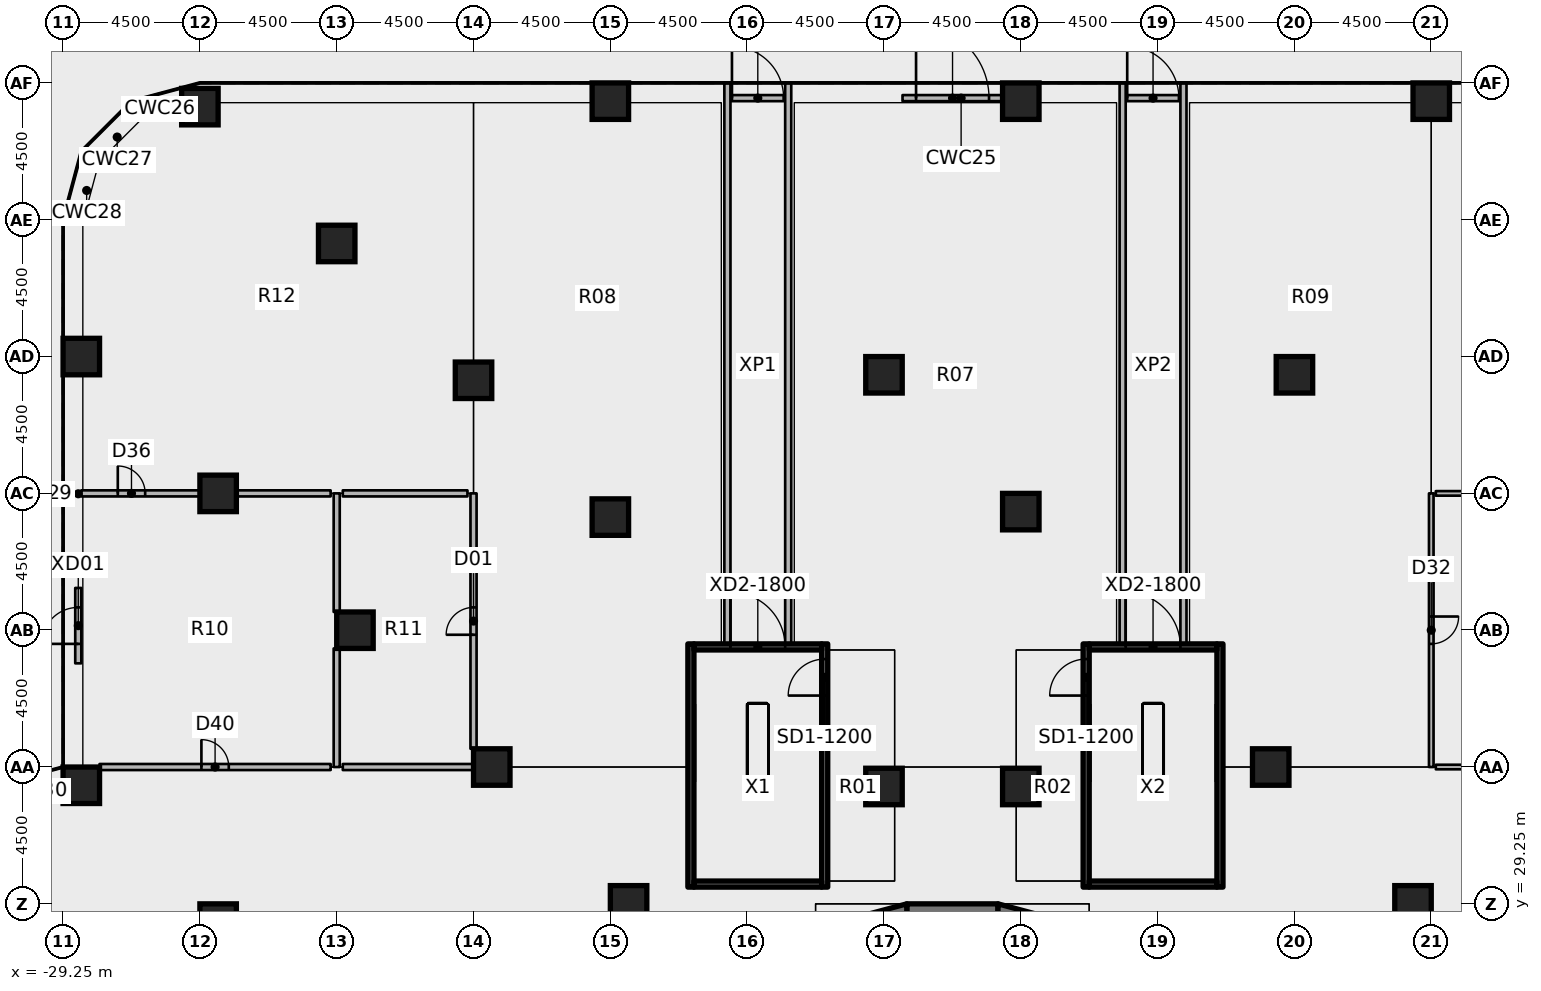
"""IFC4 building model, lengths in metres.
Left out: names, types, materials, properties, quantities, classifications, styles, units other than length and angle.
Written with IfcOpenShell. Run it as: python <this file> out.ifc"""

import sys

from ifc_helpers import new_model, si_unit, direction, frame, frame_2d, origin, origin_2d, place, context, subcontext, project, spatial, polyline, rectangle, outline, extrude, element, fill, save


model = new_model("IFC4")
c1 = context("Model", 3, precision=1e-05, world=origin(), true_north=direction((0.0, 1.0)))
c2 = subcontext(c1, "Body", "Model", "MODEL_VIEW")
j1 = project(units=[si_unit("LENGTHUNIT", "METRE"), si_unit("PLANEANGLEUNIT", "RADIAN")], contexts=[c1])
p1 = place(None, origin())
s1 = spatial("IfcSite", under=j1, at=p1, CompositionType="ELEMENT")
p2 = place(p1, origin())
s2 = spatial("IfcBuilding", under=s1, at=p2, CompositionType="ELEMENT")
p3 = place(p2, origin())
s3 = spatial("IfcBuildingStorey", under=s2, at=p3, CompositionType="ELEMENT", Elevation=0.0)
for number, where, z_axis, x_axis in (
    (1, (-28.65, 33.15, 0.0), (0.0, 0.0, 1.0), (1.0, 0.0, 0.0)),
    (2, (-28.65, 47.25, 0.0), (0.0, 0.0, 1.0), (1.0, 0.0, 0.0)),
    (3, (-24.15, 28.65, 0.0), (0.0, 0.0, 1.0), (1.0, 0.0, 0.0)),
    (4, (-24.15, 42.75, 0.0), (0.0, 0.0, 1.0), (1.0, 0.0, 0.0)),
    (5, (-24.75, 55.47, 0.0), (0.0, 0.0, 1.0), (1.0, 0.0, 0.0)),
    (6, (-19.65, 38.25, 0.0), (0.0, 0.0, 1.0), (1.0, 0.0, 0.0)),
    (7, (-20.25, 50.97, 0.0), (0.0, 0.0, 1.0), (1.0, 0.0, 0.0)),
    (8, (-15.15, 33.75, 0.0), (0.0, 0.0, 1.0), (1.0, 0.0, 0.0)),
    (9, (-15.75, 46.47, 0.0), (0.0, 0.0, 1.0), (1.0, 0.0, 0.0)),
    (10, (-10.65, 29.25, 0.0), (0.0, 0.0, 1.0), (1.0, 0.0, 0.0)),
    (11, (-11.25, 41.97, 0.0), (0.0, 0.0, 1.0), (1.0, 0.0, 0.0)),
    (12, (-11.25, 55.65, 0.0), (0.0, 0.0, 1.0), (1.0, 0.0, 0.0)),
    (13, (-2.25, 33.11, 0.0), (0.0, 0.0, 1.0), (1.0, 0.0, 0.0)),
    (14, (-2.25, 46.65, 0.0), (0.0, 0.0, 1.0), (1.0, 0.0, 0.0)),
    (15, (2.25, 33.11, 0.0), (0.0, 0.0, 1.0), (1.0, 0.0, 0.0)),
    (16, (2.25, 42.15, 0.0), (0.0, 0.0, 1.0), (1.0, 0.0, 0.0)),
    (17, (2.25, 55.65, 0.0), (0.0, 0.0, 1.0), (1.0, 0.0, 0.0)),
    (18, (10.47, 33.75, 0.0), (0.0, 0.0, 1.0), (1.0, 0.0, 0.0)),
    (19, (11.25, 46.65, 0.0), (0.0, 0.0, 1.0), (1.0, 0.0, 0.0)),
    (20, (15.15, 29.25, 0.0), (0.0, 0.0, 1.0), (1.0, 0.0, 0.0)),
    (21, (15.75, 55.65, 0.0), (0.0, 0.0, 1.0), (1.0, 0.0, 0.0)),
):
    element("IfcColumn", number, at=place(p3, frame(where, z_axis=z_axis, x_axis=x_axis)), inside=s3, PredefinedType="COLUMN", context=c2, shape_type="SweptSolid", body=[
        extrude(rectangle(XDim=1.2, YDim=1.2, at=origin_2d()), origin(), (0.0, 0.0, 1.0), 6.55),
    ])
p4 = place(p3, frame((-1.5, 28.8, 0.0), z_axis=(0.0, 0.0, 1.0), x_axis=(1.0, 0.0, 0.0)))
e22 = element("IfcWall", 22, at=p4, inside=s3, PredefinedType="SHEAR", context=c2, shape_type="SweptSolid", body=[
    extrude(rectangle(XDim=3.0, YDim=0.9, at=frame_2d((1.5, 0.0))), origin(), (0.0, 0.0, 1.0), 7.0),
])
p5 = place(p3, origin())
e23 = element("IfcWall", 23, at=p5, inside=s3, PredefinedType="SHEAR", context=c2, shape_type="SweptSolid", body=[
    extrude(outline(polyline([(-3.0, 28.848), (-1.5, 29.25), (-1.5, 28.35), (-2.55, 28.069), (-3.0, 28.848)])), origin(), (0.0, 0.0, 1.0), 7.0),
])
p6 = place(p3, origin())
e24 = element("IfcWall", 24, at=p6, inside=s3, PredefinedType="SHEAR", context=c2, shape_type="SweptSolid", body=[
    extrude(outline(polyline([(3.0, 28.848), (1.5, 29.25), (1.5, 28.35), (2.55, 28.069), (3.0, 28.848)])), origin(), (0.0, 0.0, 1.0), 7.0),
])
p7 = place(p3, frame((-1.64, 55.75, 0.0), z_axis=(0.0, 0.0, 1.0), x_axis=(1.0, 0.0, 0.0)))
e25 = element("IfcWall", 25, at=p7, inside=s3, PredefinedType="SOLIDWALL", context=c2, shape_type="SweptSolid", body=[
    extrude(rectangle(XDim=3.29, YDim=0.2, at=frame_2d((1.645, 0.0))), origin(), (0.0, 0.0, 1.0), 5.6),
])
p8 = place(p7, frame((0.445, 0.0, 0.0)))
e26 = element("IfcOpeningElement", 26, at=p8, cuts=e25, PredefinedType="OPENING", context=c2, shape_type="SweptSolid", body=[
    extrude(rectangle(XDim=2.4, YDim=2.7, at=frame_2d((1.2, 1.35))), frame((0.0, 0.11, 0.0), z_axis=(0.0, -1.0, 0.0), x_axis=(1.0, 0.0, 0.0)), (0.0, 0.0, 1.0), 0.22),
])
p9 = place(p3, frame((-28.75, 37.16, 0.0), z_axis=(0.0, 0.0, 1.0), x_axis=(0.0, 1.0, 0.0)))
e27 = element("IfcWall", 27, at=p9, inside=s3, PredefinedType="SOLIDWALL", context=c2, shape_type="SweptSolid", body=[
    extrude(rectangle(XDim=2.48, YDim=0.2, at=frame_2d((1.24, 0.0))), origin(), (0.0, 0.0, 1.0), 5.6),
])
p10 = place(p9, frame((0.64, 0.0, 0.0)))
e28 = element("IfcOpeningElement", 28, at=p10, cuts=e27, PredefinedType="OPENING", context=c2, shape_type="SweptSolid", body=[
    extrude(rectangle(XDim=1.2, YDim=2.1, at=frame_2d((0.6, 1.05))), frame((0.0, 0.11, 0.0), z_axis=(0.0, -1.0, 0.0), x_axis=(1.0, 0.0, 0.0)), (0.0, 0.0, 1.0), 0.22),
])
p11 = place(p3, frame((-7.3, 55.75, 0.0), z_axis=(0.0, 0.0, 1.0), x_axis=(1.0, 0.0, 0.0)))
e29 = element("IfcWall", 29, at=p11, inside=s3, PredefinedType="SOLIDWALL", context=c2, shape_type="SweptSolid", body=[
    extrude(rectangle(XDim=1.8, YDim=0.2, at=frame_2d((0.9, 0.0))), origin(), (0.0, 0.0, 1.0), 3.0),
])
p12 = place(p11, frame((0.05, 0.0, 0.0)))
e30 = element("IfcOpeningElement", 30, at=p12, cuts=e29, PredefinedType="OPENING", context=c2, shape_type="SweptSolid", body=[
    extrude(rectangle(XDim=1.7, YDim=2.1, at=frame_2d((0.85, 1.05))), frame((0.0, 0.11, 0.0), z_axis=(0.0, -1.0, 0.0), x_axis=(1.0, 0.0, 0.0)), (0.0, 0.0, 1.0), 0.22),
])
p13 = place(p3, frame((5.7, 55.75, 0.0), z_axis=(0.0, 0.0, 1.0), x_axis=(1.0, 0.0, 0.0)))
e31 = element("IfcWall", 31, at=p13, inside=s3, PredefinedType="SOLIDWALL", context=c2, shape_type="SweptSolid", body=[
    extrude(rectangle(XDim=1.8, YDim=0.2, at=frame_2d((0.9, 0.0))), origin(), (0.0, 0.0, 1.0), 3.0),
])
p14 = place(p13, frame((0.05, 0.0, 0.0)))
e32 = element("IfcOpeningElement", 32, at=p14, cuts=e31, PredefinedType="OPENING", context=c2, shape_type="SweptSolid", body=[
    extrude(rectangle(XDim=1.7, YDim=2.1, at=frame_2d((0.85, 1.05))), frame((0.0, 0.11, 0.0), z_axis=(0.0, -1.0, 0.0), x_axis=(1.0, 0.0, 0.0)), (0.0, 0.0, 1.0), 0.22),
])
p15 = place(p3, frame((-8.6, 29.8, 0.0), z_axis=(0.0, 0.0, 1.0), x_axis=(0.0, 1.0, 0.0)))
e33 = element("IfcWall", 33, at=p15, inside=s3, PredefinedType="SHEAR", context=c2, shape_type="SweptSolid", body=[
    extrude(rectangle(XDim=8.0, YDim=0.2, at=frame_2d((4.0, 0.0))), origin(), (0.0, 0.0, 1.0), 6.55),
])
p16 = place(p3, frame((-4.2, 29.8, 0.0), z_axis=(0.0, 0.0, 1.0), x_axis=(0.0, 1.0, 0.0)))
e34 = element("IfcWall", 34, at=p16, inside=s3, PredefinedType="SHEAR", context=c2, shape_type="SweptSolid", body=[
    extrude(rectangle(XDim=8.0, YDim=0.2, at=frame_2d((4.0, 0.0))), origin(), (0.0, 0.0, 1.0), 6.55),
])
p17 = place(p16, frame((6.3, 0.0, 0.0)))
e35 = element("IfcOpeningElement", 35, at=p17, cuts=e34, PredefinedType="OPENING", context=c2, shape_type="SweptSolid", body=[
    extrude(rectangle(XDim=1.2, YDim=2.1, at=frame_2d((0.6, 1.05))), frame((0.0, 0.11, 0.0), z_axis=(0.0, -1.0, 0.0), x_axis=(1.0, 0.0, 0.0)), (0.0, 0.0, 1.0), 0.22),
])
p18 = place(p3, frame((-8.5, 29.9, 0.0), z_axis=(0.0, 0.0, 1.0), x_axis=(1.0, 0.0, 0.0)))
e36 = element("IfcWall", 36, at=p18, inside=s3, PredefinedType="SHEAR", context=c2, shape_type="SweptSolid", body=[
    extrude(rectangle(XDim=4.2, YDim=0.2, at=frame_2d((2.1, 0.0))), origin(), (0.0, 0.0, 1.0), 6.55),
])
p19 = place(p3, frame((-8.5, 37.7, 0.0), z_axis=(0.0, 0.0, 1.0), x_axis=(1.0, 0.0, 0.0)))
e37 = element("IfcWall", 37, at=p19, inside=s3, PredefinedType="SHEAR", context=c2, shape_type="SweptSolid", body=[
    extrude(rectangle(XDim=4.2, YDim=0.2, at=frame_2d((2.1, 0.0))), origin(), (0.0, 0.0, 1.0), 6.55),
])
p20 = place(p19, frame((1.2, 0.0, 0.0)))
e38 = element("IfcOpeningElement", 38, at=p20, cuts=e37, PredefinedType="OPENING", context=c2, shape_type="SweptSolid", body=[
    extrude(rectangle(XDim=1.8, YDim=2.1, at=frame_2d((0.9, 1.05))), frame((0.0, 0.11, 0.0), z_axis=(0.0, -1.0, 0.0), x_axis=(1.0, 0.0, 0.0)), (0.0, 0.0, 1.0), 0.22),
])
for number, where, z_axis, x_axis in (
    (39, (-7.4, 37.6, 0.0), (0.0, 0.0, 1.0), (0.0, 1.0, 0.0)),
    (40, (-5.4, 37.6, 0.0), (0.0, 0.0, 1.0), (0.0, 1.0, 0.0)),
):
    element("IfcWall", number, at=place(p3, frame(where, z_axis=z_axis, x_axis=x_axis)), inside=s3, PredefinedType="PARTITIONING", context=c2, shape_type="SweptSolid", body=[
        extrude(rectangle(XDim=18.65, YDim=0.2, at=frame_2d((9.325, 0.0))), origin(), (0.0, 0.0, 1.0), 6.55),
    ])
p21 = place(p3, frame((4.4, 29.8, 0.0), z_axis=(0.0, 0.0, 1.0), x_axis=(0.0, 1.0, 0.0)))
e41 = element("IfcWall", 41, at=p21, inside=s3, PredefinedType="SHEAR", context=c2, shape_type="SweptSolid", body=[
    extrude(rectangle(XDim=8.0, YDim=0.2, at=frame_2d((4.0, 0.0))), origin(), (0.0, 0.0, 1.0), 6.55),
])
p22 = place(p21, frame((6.3, 0.0, 0.0)))
e42 = element("IfcOpeningElement", 42, at=p22, cuts=e41, PredefinedType="OPENING", context=c2, shape_type="SweptSolid", body=[
    extrude(rectangle(XDim=1.2, YDim=2.1, at=frame_2d((0.6, 1.05))), frame((0.0, 0.11, 0.0), z_axis=(0.0, -1.0, 0.0), x_axis=(1.0, 0.0, 0.0)), (0.0, 0.0, 1.0), 0.22),
])
p23 = place(p3, frame((8.8, 29.8, 0.0), z_axis=(0.0, 0.0, 1.0), x_axis=(0.0, 1.0, 0.0)))
e43 = element("IfcWall", 43, at=p23, inside=s3, PredefinedType="SHEAR", context=c2, shape_type="SweptSolid", body=[
    extrude(rectangle(XDim=8.0, YDim=0.2, at=frame_2d((4.0, 0.0))), origin(), (0.0, 0.0, 1.0), 6.55),
])
p24 = place(p3, frame((4.5, 29.9, 0.0), z_axis=(0.0, 0.0, 1.0), x_axis=(1.0, 0.0, 0.0)))
e44 = element("IfcWall", 44, at=p24, inside=s3, PredefinedType="SHEAR", context=c2, shape_type="SweptSolid", body=[
    extrude(rectangle(XDim=4.2, YDim=0.2, at=frame_2d((2.1, 0.0))), origin(), (0.0, 0.0, 1.0), 6.55),
])
p25 = place(p3, frame((4.5, 37.7, 0.0), z_axis=(0.0, 0.0, 1.0), x_axis=(1.0, 0.0, 0.0)))
e45 = element("IfcWall", 45, at=p25, inside=s3, PredefinedType="SHEAR", context=c2, shape_type="SweptSolid", body=[
    extrude(rectangle(XDim=4.2, YDim=0.2, at=frame_2d((2.1, 0.0))), origin(), (0.0, 0.0, 1.0), 6.55),
])
p26 = place(p25, frame((1.2, 0.0, 0.0)))
e46 = element("IfcOpeningElement", 46, at=p26, cuts=e45, PredefinedType="OPENING", context=c2, shape_type="SweptSolid", body=[
    extrude(rectangle(XDim=1.8, YDim=2.1, at=frame_2d((0.9, 1.05))), frame((0.0, 0.11, 0.0), z_axis=(0.0, -1.0, 0.0), x_axis=(1.0, 0.0, 0.0)), (0.0, 0.0, 1.0), 0.22),
])
for number, where, z_axis, x_axis in (
    (47, (5.6, 37.6, 0.0), (0.0, 0.0, 1.0), (0.0, 1.0, 0.0)),
    (48, (7.6, 37.6, 0.0), (0.0, 0.0, 1.0), (0.0, 1.0, 0.0)),
):
    element("IfcWall", number, at=place(p3, frame(where, z_axis=z_axis, x_axis=x_axis)), inside=s3, PredefinedType="PARTITIONING", context=c2, shape_type="SweptSolid", body=[
        extrude(rectangle(XDim=18.65, YDim=0.2, at=frame_2d((9.325, 0.0))), origin(), (0.0, 0.0, 1.0), 6.55),
    ])
p27 = place(p3, frame((-15.75, 34.35, 0.0), z_axis=(0.0, 0.0, 1.0), x_axis=(0.0, 1.0, 0.0)))
e49 = element("IfcWall", 49, at=p27, inside=s3, PredefinedType="PARTITIONING", context=c2, shape_type="SweptSolid", body=[
    extrude(rectangle(XDim=8.4, YDim=0.2, at=frame_2d((4.2, 0.0))), origin(), (0.0, 0.0, 1.0), 6.55),
])
p28 = place(p27, frame((3.75, 0.0, 0.0)))
e50 = element("IfcOpeningElement", 50, at=p28, cuts=e49, PredefinedType="OPENING", context=c2, shape_type="SweptSolid", body=[
    extrude(rectangle(XDim=0.9, YDim=2.1, at=frame_2d((0.45, 1.05))), frame((0.0, 0.11, 0.0), z_axis=(0.0, -1.0, 0.0), x_axis=(1.0, 0.0, 0.0)), (0.0, 0.0, 1.0), 0.22),
])
p29 = place(p3, frame((15.75, 42.75, 0.0), z_axis=(0.0, 0.0, 1.0), x_axis=(0.0, -1.0, 0.0)))
e51 = element("IfcWall", 51, at=p29, inside=s3, PredefinedType="PARTITIONING", context=c2, shape_type="SweptSolid", body=[
    extrude(rectangle(XDim=9.0, YDim=0.15, at=frame_2d((4.5, 0.0))), origin(), (0.0, 0.0, 1.0), 6.55),
])
p30 = place(p29, frame((4.05, 0.0, 0.0)))
e52 = element("IfcOpeningElement", 52, at=p30, cuts=e51, PredefinedType="OPENING", context=c2, shape_type="SweptSolid", body=[
    extrude(rectangle(XDim=0.9, YDim=2.1, at=frame_2d((0.45, 1.05))), frame((0.0, 0.085, 0.0), z_axis=(0.0, -1.0, 0.0), x_axis=(1.0, 0.0, 0.0)), (0.0, 0.0, 1.0), 0.17),
])
for number, where, z_axis, x_axis in (
    (53, (-20.25, 42.75, 0.0), (0.0, 0.0, 1.0), (0.0, -1.0, 0.0)),
    (54, (-20.25, 37.65, 0.0), (0.0, 0.0, 1.0), (0.0, -1.0, 0.0)),
):
    element("IfcWall", number, at=place(p3, frame(where, z_axis=z_axis, x_axis=x_axis)), inside=s3, PredefinedType="PARTITIONING", context=c2, shape_type="SweptSolid", body=[
        extrude(rectangle(XDim=3.9, YDim=0.2, at=frame_2d((1.95, 0.0))), origin(), (0.0, 0.0, 1.0), 6.55),
    ])
p31 = place(p3, frame((-28.65, 42.75, 0.0), z_axis=(0.0, 0.0, 1.0), x_axis=(1.0, 0.0, 0.0)))
e55 = element("IfcWall", 55, at=p31, inside=s3, PredefinedType="PARTITIONING", context=c2, shape_type="SweptSolid", body=[
    extrude(rectangle(XDim=3.9, YDim=0.2, at=frame_2d((1.95, 0.0))), origin(), (0.0, 0.0, 1.0), 6.55),
])
p32 = place(p31, frame((1.2, 0.0, 0.0)))
e56 = element("IfcOpeningElement", 56, at=p32, cuts=e55, PredefinedType="OPENING", context=c2, shape_type="SweptSolid", body=[
    extrude(rectangle(XDim=0.9, YDim=2.1, at=frame_2d((0.45, 1.05))), frame((0.0, 0.11, 0.0), z_axis=(0.0, -1.0, 0.0), x_axis=(1.0, 0.0, 0.0)), (0.0, 0.0, 1.0), 0.22),
])
p33 = place(p3, frame((-23.55, 42.75, 0.0), z_axis=(0.0, 0.0, 1.0), x_axis=(1.0, 0.0, 0.0)))
e57 = element("IfcWall", 57, at=p33, inside=s3, PredefinedType="PARTITIONING", context=c2, shape_type="SweptSolid", body=[
    extrude(rectangle(XDim=3.1, YDim=0.2, at=frame_2d((1.55, 0.0))), origin(), (0.0, 0.0, 1.0), 6.55),
])
p34 = place(p3, frame((-28.05, 33.75, 0.0), z_axis=(0.0, 0.0, 1.0), x_axis=(1.0, 0.0, 0.0)))
e58 = element("IfcWall", 58, at=p34, inside=s3, PredefinedType="PARTITIONING", context=c2, shape_type="SweptSolid", body=[
    extrude(rectangle(XDim=7.6, YDim=0.2, at=frame_2d((3.8, 0.0))), origin(), (0.0, 0.0, 1.0), 6.55),
])
p35 = place(p34, frame((3.35, 0.0, 0.0)))
e59 = element("IfcOpeningElement", 59, at=p35, cuts=e58, PredefinedType="OPENING", context=c2, shape_type="SweptSolid", body=[
    extrude(rectangle(XDim=0.9, YDim=2.1, at=frame_2d((0.45, 1.05))), frame((0.0, 0.11, 0.0), z_axis=(0.0, -1.0, 0.0), x_axis=(1.0, 0.0, 0.0)), (0.0, 0.0, 1.0), 0.22),
])
p36 = place(p3, frame((-20.05, 42.75, 0.0), z_axis=(0.0, 0.0, 1.0), x_axis=(1.0, 0.0, 0.0)))
e60 = element("IfcWall", 60, at=p36, inside=s3, PredefinedType="PARTITIONING", context=c2, shape_type="SweptSolid", body=[
    extrude(rectangle(XDim=4.1, YDim=0.2, at=frame_2d((2.05, 0.0))), origin(), (0.0, 0.0, 1.0), 6.55),
])
p37 = place(p3, frame((-15.75, 33.75, 0.0), z_axis=(0.0, 0.0, 1.0), x_axis=(-1.0, 0.0, 0.0)))
e61 = element("IfcWall", 61, at=p37, inside=s3, PredefinedType="PARTITIONING", context=c2, shape_type="SweptSolid", body=[
    extrude(rectangle(XDim=4.3, YDim=0.2, at=frame_2d((2.15, 0.0))), origin(), (0.0, 0.0, 1.0), 6.55),
])
p38 = place(p3, frame((15.9, 42.75, 0.0), z_axis=(0.0, 0.0, 1.0), x_axis=(1.0, 0.0, 0.0)))
e62 = element("IfcWall", 62, at=p38, inside=s3, PredefinedType="PARTITIONING", context=c2, shape_type="SweptSolid", body=[
    extrude(rectangle(XDim=12.15, YDim=0.15, at=frame_2d((6.075, 0.0))), origin(), (0.0, 0.0, 1.0), 6.55),
])
p39 = place(p38, frame((5.625, 0.0, 0.0)))
e63 = element("IfcOpeningElement", 63, at=p39, cuts=e62, PredefinedType="OPENING", context=c2, shape_type="SweptSolid", body=[
    extrude(rectangle(XDim=0.9, YDim=2.1, at=frame_2d((0.45, 1.05))), frame((0.0, 0.085, 0.0), z_axis=(0.0, -1.0, 0.0), x_axis=(1.0, 0.0, 0.0)), (0.0, 0.0, 1.0), 0.17),
])
p40 = place(p3, frame((23.55, 33.75, 0.0), z_axis=(0.0, 0.0, 1.0), x_axis=(-1.0, 0.0, 0.0)))
e64 = element("IfcWall", 64, at=p40, inside=s3, PredefinedType="PARTITIONING", context=c2, shape_type="SweptSolid", body=[
    extrude(rectangle(XDim=7.65, YDim=0.15, at=frame_2d((3.825, 0.0))), origin(), (0.0, 0.0, 1.0), 6.55),
])
p41 = place(p8, origin())
e65 = element("IfcDoor", 65, at=p41, inside=s3, OperationType="SINGLE_SWING_LEFT", PredefinedType="DOOR", context=c2, shape_type="SweptSolid", body=[
    extrude(rectangle(XDim=2.4, YDim=2.7, at=frame_2d((1.2, 1.35))), frame((0.0, 0.025, 0.0), z_axis=(0.0, -1.0, 0.0), x_axis=(1.0, 0.0, 0.0)), (0.0, 0.0, 1.0), 0.05),
])
fill(e26, e65)
p42 = place(p10, origin())
e66 = element("IfcDoor", 66, at=p42, inside=s3, OperationType="SINGLE_SWING_LEFT", PredefinedType="DOOR", context=c2, shape_type="SweptSolid", body=[
    extrude(rectangle(XDim=1.2, YDim=2.1, at=frame_2d((0.6, 1.05))), frame((0.0, 0.025, 0.0), z_axis=(0.0, -1.0, 0.0), x_axis=(1.0, 0.0, 0.0)), (0.0, 0.0, 1.0), 0.05),
])
fill(e28, e66)
p43 = place(p12, origin())
e67 = element("IfcDoor", 67, at=p43, inside=s3, OperationType="SINGLE_SWING_LEFT", PredefinedType="DOOR", context=c2, shape_type="SweptSolid", body=[
    extrude(rectangle(XDim=1.7, YDim=2.1, at=frame_2d((0.85, 1.05))), frame((0.0, 0.025, 0.0), z_axis=(0.0, -1.0, 0.0), x_axis=(1.0, 0.0, 0.0)), (0.0, 0.0, 1.0), 0.05),
])
fill(e30, e67)
p44 = place(p14, origin())
e68 = element("IfcDoor", 68, at=p44, inside=s3, OperationType="SINGLE_SWING_LEFT", PredefinedType="DOOR", context=c2, shape_type="SweptSolid", body=[
    extrude(rectangle(XDim=1.7, YDim=2.1, at=frame_2d((0.85, 1.05))), frame((0.0, 0.025, 0.0), z_axis=(0.0, -1.0, 0.0), x_axis=(1.0, 0.0, 0.0)), (0.0, 0.0, 1.0), 0.05),
])
fill(e32, e68)
p45 = place(p17, origin())
e69 = element("IfcDoor", 69, at=p45, inside=s3, OperationType="SINGLE_SWING_RIGHT", PredefinedType="DOOR", context=c2, shape_type="SweptSolid", body=[
    extrude(rectangle(XDim=1.2, YDim=2.1, at=frame_2d((0.6, 1.05))), frame((0.0, 0.025, 0.0), z_axis=(0.0, -1.0, 0.0), x_axis=(1.0, 0.0, 0.0)), (0.0, 0.0, 1.0), 0.05),
])
fill(e35, e69)
p46 = place(p20, origin())
e70 = element("IfcDoor", 70, at=p46, inside=s3, OperationType="DOUBLE_DOOR_SINGLE_SWING", PredefinedType="DOOR", context=c2, shape_type="SweptSolid", body=[
    extrude(rectangle(XDim=1.8, YDim=2.1, at=frame_2d((0.9, 1.05))), frame((0.0, 0.025, 0.0), z_axis=(0.0, -1.0, 0.0), x_axis=(1.0, 0.0, 0.0)), (0.0, 0.0, 1.0), 0.05),
])
fill(e38, e70)
p47 = place(p22, origin())
e71 = element("IfcDoor", 71, at=p47, inside=s3, OperationType="SINGLE_SWING_LEFT", PredefinedType="DOOR", context=c2, shape_type="SweptSolid", body=[
    extrude(rectangle(XDim=1.2, YDim=2.1, at=frame_2d((0.6, 1.05))), frame((0.0, 0.025, 0.0), z_axis=(0.0, -1.0, 0.0), x_axis=(1.0, 0.0, 0.0)), (0.0, 0.0, 1.0), 0.05),
])
fill(e42, e71)
p48 = place(p26, origin())
e72 = element("IfcDoor", 72, at=p48, inside=s3, OperationType="DOUBLE_DOOR_SINGLE_SWING", PredefinedType="DOOR", context=c2, shape_type="SweptSolid", body=[
    extrude(rectangle(XDim=1.8, YDim=2.1, at=frame_2d((0.9, 1.05))), frame((0.0, 0.025, 0.0), z_axis=(0.0, -1.0, 0.0), x_axis=(1.0, 0.0, 0.0)), (0.0, 0.0, 1.0), 0.05),
])
fill(e46, e72)
p49 = place(p28, origin())
e73 = element("IfcDoor", 73, at=p49, inside=s3, OperationType="SINGLE_SWING_LEFT", PredefinedType="DOOR", context=c2, shape_type="SweptSolid", body=[
    extrude(rectangle(XDim=0.9, YDim=2.1, at=frame_2d((0.45, 1.05))), frame((0.0, 0.025, 0.0), z_axis=(0.0, -1.0, 0.0), x_axis=(1.0, 0.0, 0.0)), (0.0, 0.0, 1.0), 0.05),
])
fill(e50, e73)
p50 = place(p30, origin())
e74 = element("IfcDoor", 74, at=p50, inside=s3, OperationType="SINGLE_SWING_LEFT", PredefinedType="DOOR", context=c2, shape_type="SweptSolid", body=[
    extrude(rectangle(XDim=0.9, YDim=2.1, at=frame_2d((0.45, 1.05))), frame((0.0, 0.025, 0.0), z_axis=(0.0, -1.0, 0.0), x_axis=(1.0, 0.0, 0.0)), (0.0, 0.0, 1.0), 0.05),
])
fill(e52, e74)
p51 = place(p32, origin())
e75 = element("IfcDoor", 75, at=p51, inside=s3, OperationType="SINGLE_SWING_LEFT", PredefinedType="DOOR", context=c2, shape_type="SweptSolid", body=[
    extrude(rectangle(XDim=0.9, YDim=2.1, at=frame_2d((0.45, 1.05))), frame((0.0, 0.025, 0.0), z_axis=(0.0, -1.0, 0.0), x_axis=(1.0, 0.0, 0.0)), (0.0, 0.0, 1.0), 0.05),
])
fill(e56, e75)
p52 = place(p35, origin())
e76 = element("IfcDoor", 76, at=p52, inside=s3, OperationType="SINGLE_SWING_LEFT", PredefinedType="DOOR", context=c2, shape_type="SweptSolid", body=[
    extrude(rectangle(XDim=0.9, YDim=2.1, at=frame_2d((0.45, 1.05))), frame((0.0, 0.025, 0.0), z_axis=(0.0, -1.0, 0.0), x_axis=(1.0, 0.0, 0.0)), (0.0, 0.0, 1.0), 0.05),
])
fill(e59, e76)
save(model, sys.argv[1])
